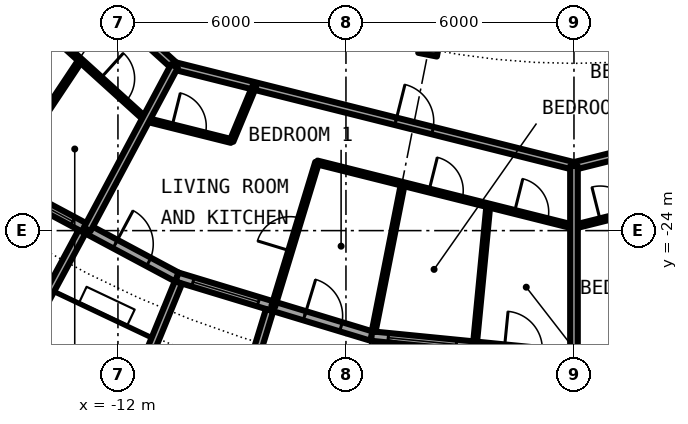
"""IFC4 building model, lengths in metres.
Left out: names, types, materials, properties, quantities, classifications, styles, units other than length and angle.
Written with IfcOpenShell. Run it as: python <this file> out.ifc"""

import sys

from ifc_helpers import new_model, si_unit, direction, frame, frame_2d, origin, origin_2d, place, context, subcontext, project, spatial, rectangle, i_section, extrude, element, fill, save


model = new_model("IFC4")
c1 = context("Model", 3, precision=1e-05, world=origin(), true_north=direction((0.0, 1.0)))
c2 = subcontext(c1, "Body", "Model", "MODEL_VIEW")
j1 = project(units=[si_unit("LENGTHUNIT", "METRE"), si_unit("PLANEANGLEUNIT", "RADIAN")], contexts=[c1])
p1 = place(None, origin())
s1 = spatial("IfcSite", under=j1, at=p1, CompositionType="ELEMENT")
p2 = place(p1, origin())
s2 = spatial("IfcBuilding", under=s1, at=p2, CompositionType="ELEMENT")
p3 = place(p2, frame((0.0, 0.0, 161.6)))
s3 = spatial("IfcBuildingStorey", under=s2, at=p3, CompositionType="ELEMENT", Elevation=161.6)
p4 = place(p3, frame((-3.824, -19.223, 0.0), z_axis=(0.0, 0.0, 1.0), x_axis=(-0.195090322016, -0.980785280403, 0.0)))
e1 = element("IfcColumn", 1, at=p4, inside=s3, PredefinedType="COLUMN", context=c2, shape_type="SweptSolid", body=[
    extrude(i_section(OverallWidth=0.3, OverallDepth=0.5, WebThickness=0.014, FlangeThickness=0.028, FilletRadius=0.027, at=origin_2d()), origin(), (0.0, 0.0, 1.0), 3.05),
])
p5 = place(p3, frame((-15.167, -22.699, 0.0), z_axis=(0.0, 0.0, 1.0), x_axis=(0.881915646801, -0.471407246368, 0.0)))
e2 = element("IfcWall", 2, at=p5, inside=s3, PredefinedType="SOLIDWALL", context=c2, shape_type="SweptSolid", body=[
    extrude(rectangle(XDim=5.352, YDim=0.25, at=frame_2d((2.676, 0.0))), origin(), (0.0, 0.0, 1.0), 2.7),
])
p6 = place(p5, frame((0.441, 0.0, 0.3)))
e3 = element("IfcOpeningElement", 3, at=p6, cuts=e2, PredefinedType="OPENING", context=c2, shape_type="SweptSolid", body=[
    extrude(rectangle(XDim=1.8, YDim=2.1, at=frame_2d((0.9, 1.05))), frame((0.0, 0.135, 0.0), z_axis=(0.0, -1.0, 0.0), x_axis=(1.0, 0.0, 0.0)), (0.0, 0.0, 1.0), 0.27),
])
p7 = place(p5, frame((3.51, 0.0, 0.0)))
e4 = element("IfcOpeningElement", 4, at=p7, cuts=e2, PredefinedType="OPENING", context=c2, shape_type="SweptSolid", body=[
    extrude(rectangle(XDim=1.0, YDim=2.2, at=frame_2d((0.5, 1.1))), frame((0.0, 0.135, 0.0), z_axis=(0.0, -1.0, 0.0), x_axis=(1.0, 0.0, 0.0)), (0.0, 0.0, 1.0), 0.27),
])
p8 = place(p3, frame((-12.945, -24.029, -0.03), z_axis=(0.0, 0.0, 1.0), x_axis=(-0.474424310775, -0.88029629861, 0.0)))
e5 = element("IfcWall", 5, at=p8, inside=s3, PredefinedType="SOLIDWALL", context=c2, shape_type="SweptSolid", body=[
    extrude(rectangle(XDim=3.006, YDim=0.2, at=frame_2d((1.503, 0.0))), origin(), (0.0, 0.0, 1.0), 2.73),
])
p9 = place(p3, frame((-10.447, -25.222, 0.0), z_axis=(0.0, 0.0, 1.0), x_axis=(0.956965678721, -0.290201119486, 0.0)))
e6 = element("IfcWall", 6, at=p9, inside=s3, PredefinedType="SOLIDWALL", context=c2, shape_type="SweptSolid", body=[
    extrude(rectangle(XDim=5.351, YDim=0.25, at=frame_2d((2.676, 0.0))), origin(), (0.0, 0.0, 1.0), 2.7),
])
p10 = place(p9, frame((0.441, 0.0, 0.3)))
e7 = element("IfcOpeningElement", 7, at=p10, cuts=e6, PredefinedType="OPENING", context=c2, shape_type="SweptSolid", body=[
    extrude(rectangle(XDim=1.8, YDim=2.1, at=frame_2d((0.9, 1.05))), frame((0.0, 0.135, 0.0), z_axis=(0.0, -1.0, 0.0), x_axis=(1.0, 0.0, 0.0)), (0.0, 0.0, 1.0), 0.27),
])
p11 = place(p9, frame((3.51, 0.0, 0.0)))
e8 = element("IfcOpeningElement", 8, at=p11, cuts=e6, PredefinedType="OPENING", context=c2, shape_type="SweptSolid", body=[
    extrude(rectangle(XDim=1.0, YDim=2.2, at=frame_2d((0.5, 1.1))), frame((0.0, 0.135, 0.0), z_axis=(0.0, -1.0, 0.0), x_axis=(1.0, 0.0, 0.0)), (0.0, 0.0, 1.0), 0.27),
])
p12 = place(p3, frame((-10.409, -25.364, -0.03), z_axis=(0.0, 0.0, 1.0), x_axis=(-0.379509886562, -0.925187681501, 0.0)))
e9 = element("IfcWall", 9, at=p12, inside=s3, PredefinedType="SOLIDWALL", context=c2, shape_type="SweptSolid", body=[
    extrude(rectangle(XDim=2.883, YDim=0.2, at=frame_2d((1.441, 0.0))), origin(), (0.0, 0.0, 1.0), 2.73),
])
p13 = place(p3, frame((-8.009, -26.092, -0.03), z_axis=(0.0, 0.0, 1.0), x_axis=(-0.293406695073, -0.955987715029, 0.0)))
e10 = element("IfcWall", 10, at=p13, inside=s3, PredefinedType="SOLIDWALL", context=c2, shape_type="SweptSolid", body=[
    extrude(rectangle(XDim=3.006, YDim=0.2, at=frame_2d((1.503, 0.0))), origin(), (0.0, 0.0, 1.0), 2.73),
])
p14 = place(p3, frame((-5.326, -26.775, 0.0), z_axis=(0.0, 0.0, 1.0), x_axis=(0.995173996315, -0.098126026407, 0.0)))
e11 = element("IfcWall", 11, at=p14, inside=s3, PredefinedType="SOLIDWALL", context=c2, shape_type="SweptSolid", body=[
    extrude(rectangle(XDim=5.352, YDim=0.25, at=frame_2d((2.676, 0.0))), origin(), (0.0, 0.0, 1.0), 2.7),
])
p15 = place(p14, frame((0.441, 0.0, 0.3)))
e12 = element("IfcOpeningElement", 12, at=p15, cuts=e11, PredefinedType="OPENING", context=c2, shape_type="SweptSolid", body=[
    extrude(rectangle(XDim=1.8, YDim=2.1, at=frame_2d((0.9, 1.05))), frame((0.0, 0.135, 0.0), z_axis=(0.0, -1.0, 0.0), x_axis=(1.0, 0.0, 0.0)), (0.0, 0.0, 1.0), 0.27),
])
p16 = place(p14, frame((3.51, 0.0, 0.0)))
e13 = element("IfcOpeningElement", 13, at=p16, cuts=e11, PredefinedType="OPENING", context=c2, shape_type="SweptSolid", body=[
    extrude(rectangle(XDim=1.0, YDim=2.2, at=frame_2d((0.5, 1.1))), frame((0.0, 0.135, 0.0), z_axis=(0.0, -1.0, 0.0), x_axis=(1.0, 0.0, 0.0)), (0.0, 0.0, 1.0), 0.27),
])
p17 = place(p3, frame((-4.769, -26.956, -0.03), z_axis=(0.0, 0.0, 1.0), x_axis=(-0.174056778901, -0.984735618183, 0.0)))
e14 = element("IfcWall", 14, at=p17, inside=s3, PredefinedType="SOLIDWALL", context=c2, shape_type="SweptSolid", body=[
    extrude(rectangle(XDim=2.925, YDim=0.2, at=frame_2d((1.462, 0.0))), origin(), (0.0, 0.0, 1.0), 2.73),
])
p18 = place(p3, frame((0.0, -27.3, 0.0), z_axis=(0.0, 0.0, 1.0), x_axis=(0.995173996315, 0.098126026407, 0.0)))
e15 = element("IfcWall", 15, at=p18, inside=s3, PredefinedType="SOLIDWALL", context=c2, shape_type="SweptSolid", body=[
    extrude(rectangle(XDim=5.352, YDim=0.25, at=frame_2d((2.676, 0.0))), origin(), (0.0, 0.0, 1.0), 2.7),
])
p19 = place(p18, frame((0.441, 0.0, 0.3)))
e16 = element("IfcOpeningElement", 16, at=p19, cuts=e15, PredefinedType="OPENING", context=c2, shape_type="SweptSolid", body=[
    extrude(rectangle(XDim=1.8, YDim=2.1, at=frame_2d((0.9, 1.05))), frame((0.0, 0.135, 0.0), z_axis=(0.0, -1.0, 0.0), x_axis=(1.0, 0.0, 0.0)), (0.0, 0.0, 1.0), 0.27),
])
p20 = place(p18, frame((3.51, 0.0, 0.0)))
e17 = element("IfcOpeningElement", 17, at=p20, cuts=e15, PredefinedType="OPENING", context=c2, shape_type="SweptSolid", body=[
    extrude(rectangle(XDim=1.0, YDim=2.2, at=frame_2d((0.5, 1.1))), frame((0.0, 0.135, 0.0), z_axis=(0.0, -1.0, 0.0), x_axis=(1.0, 0.0, 0.0)), (0.0, 0.0, 1.0), 0.27),
])
p21 = place(p3, frame((-16.432, -16.396, 0.0), z_axis=(0.0, 0.0, 1.0), x_axis=(0.740901429238, -0.671613781986, 0.0)))
e18 = element("IfcWall", 18, at=p21, inside=s3, PredefinedType="PARTITIONING", context=c2, shape_type="SweptSolid", body=[
    extrude(rectangle(XDim=6.97, YDim=0.1, at=frame_2d((3.485, 0.0))), origin(), (0.0, 0.0, 1.0), 2.7),
])
p22 = place(p21, frame((3.038, 0.0, 0.0)))
e19 = element("IfcOpeningElement", 19, at=p22, cuts=e18, PredefinedType="OPENING", context=c2, shape_type="SweptSolid", body=[
    extrude(rectangle(XDim=0.9, YDim=2.3, at=frame_2d((0.45, 1.15))), frame((0.0, 0.06, 0.0), z_axis=(0.0, -1.0, 0.0), x_axis=(1.0, 0.0, 0.0)), (0.0, 0.0, 1.0), 0.12),
])
p23 = place(p21, frame((5.36, 0.0, 0.0)))
e20 = element("IfcOpeningElement", 20, at=p23, cuts=e18, PredefinedType="OPENING", context=c2, shape_type="SweptSolid", body=[
    extrude(rectangle(XDim=0.9, YDim=2.3, at=frame_2d((0.45, 1.15))), frame((0.0, 0.06, 0.0), z_axis=(0.0, -1.0, 0.0), x_axis=(1.0, 0.0, 0.0)), (0.0, 0.0, 1.0), 0.12),
])
p24 = place(p3, frame((-11.268, -21.078, 0.0), z_axis=(0.0, 0.0, 1.0), x_axis=(0.970018653366, -0.243030475708, 0.0)))
e21 = element("IfcWall", 21, at=p24, inside=s3, PredefinedType="PARTITIONING", context=c2, shape_type="SweptSolid", body=[
    extrude(rectangle(XDim=2.322, YDim=0.1, at=frame_2d((1.161, 0.0))), origin(), (0.0, 0.0, 1.0), 2.7),
])
p25 = place(p24, frame((0.713, 0.0, 0.0)))
e22 = element("IfcOpeningElement", 22, at=p25, cuts=e21, PredefinedType="OPENING", context=c2, shape_type="SweptSolid", body=[
    extrude(rectangle(XDim=0.9, YDim=2.3, at=frame_2d((0.45, 1.15))), frame((0.0, 0.06, 0.0), z_axis=(0.0, -1.0, 0.0), x_axis=(1.0, 0.0, 0.0)), (0.0, 0.0, 1.0), 0.12),
])
p26 = place(p3, frame((-6.762, -22.206, 0.0), z_axis=(0.0, 0.0, 1.0), x_axis=(0.97002908491, -0.242988836015, 0.0)))
e23 = element("IfcWall", 23, at=p26, inside=s3, PredefinedType="PARTITIONING", context=c2, shape_type="SweptSolid", body=[
    extrude(rectangle(XDim=6.971, YDim=0.1, at=frame_2d((3.485, 0.0))), origin(), (0.0, 0.0, 1.0), 2.7),
])
p27 = place(p26, frame((3.039, 0.0, 0.0)))
e24 = element("IfcOpeningElement", 24, at=p27, cuts=e23, PredefinedType="OPENING", context=c2, shape_type="SweptSolid", body=[
    extrude(rectangle(XDim=0.9, YDim=2.3, at=frame_2d((0.45, 1.15))), frame((0.0, 0.06, 0.0), z_axis=(0.0, -1.0, 0.0), x_axis=(1.0, 0.0, 0.0)), (0.0, 0.0, 1.0), 0.12),
])
p28 = place(p26, frame((5.358, 0.0, 0.0)))
e25 = element("IfcOpeningElement", 25, at=p28, cuts=e23, PredefinedType="OPENING", context=c2, shape_type="SweptSolid", body=[
    extrude(rectangle(XDim=0.9, YDim=2.3, at=frame_2d((0.45, 1.15))), frame((0.0, 0.06, 0.0), z_axis=(0.0, -1.0, 0.0), x_axis=(1.0, 0.0, 0.0)), (0.0, 0.0, 1.0), 0.12),
])
p29 = place(p3, frame((0.0, -23.9, 0.0), z_axis=(0.0, 0.0, 1.0), x_axis=(0.97002908491, 0.242988836015, 0.0)))
e26 = element("IfcWall", 26, at=p29, inside=s3, PredefinedType="PARTITIONING", context=c2, shape_type="SweptSolid", body=[
    extrude(rectangle(XDim=6.971, YDim=0.1, at=frame_2d((3.485, 0.0))), origin(), (0.0, 0.0, 1.0), 2.7),
])
p30 = place(p29, frame((3.032, 0.0, 0.0)))
e27 = element("IfcOpeningElement", 27, at=p30, cuts=e26, PredefinedType="OPENING", context=c2, shape_type="SweptSolid", body=[
    extrude(rectangle(XDim=0.9, YDim=2.3, at=frame_2d((0.45, 1.15))), frame((0.0, 0.06, 0.0), z_axis=(0.0, -1.0, 0.0), x_axis=(1.0, 0.0, 0.0)), (0.0, 0.0, 1.0), 0.12),
])
p31 = place(p29, frame((0.712, 0.0, 0.0)))
e28 = element("IfcOpeningElement", 28, at=p31, cuts=e26, PredefinedType="OPENING", context=c2, shape_type="SweptSolid", body=[
    extrude(rectangle(XDim=0.9, YDim=2.3, at=frame_2d((0.45, 1.15))), frame((0.0, 0.06, 0.0), z_axis=(0.0, -1.0, 0.0), x_axis=(1.0, 0.0, 0.0)), (0.0, 0.0, 1.0), 0.12),
])
p32 = place(p3, frame((-18.542, -12.389, 0.0), z_axis=(0.0, 0.0, 1.0), x_axis=(0.740947367223, -0.671563101283, 0.0)))
e29 = element("IfcWall", 29, at=p32, inside=s3, PredefinedType="PARTITIONING", context=c2, shape_type="SweptSolid", body=[
    extrude(rectangle(XDim=10.837, YDim=0.2, at=frame_2d((5.419, 0.0))), origin(), (0.0, 0.0, 1.0), 2.7),
])
p33 = place(p32, frame((6.002, 0.0, 0.0)))
e30 = element("IfcOpeningElement", 30, at=p33, cuts=e29, PredefinedType="OPENING", context=c2, shape_type="SweptSolid", body=[
    extrude(rectangle(XDim=1.0, YDim=2.3, at=frame_2d((0.5, 1.15))), frame((0.0, 0.11, 0.0), z_axis=(0.0, -1.0, 0.0), x_axis=(1.0, 0.0, 0.0)), (0.0, 0.0, 1.0), 0.22),
])
p34 = place(p3, frame((-10.518, -19.665, 0.0), z_axis=(0.0, 0.0, 1.0), x_axis=(0.970023181991, -0.243012399685, 0.0)))
e31 = element("IfcWall", 31, at=p34, inside=s3, PredefinedType="PARTITIONING", context=c2, shape_type="SweptSolid", body=[
    extrude(rectangle(XDim=10.843, YDim=0.2, at=frame_2d((5.421, 0.0))), origin(), (0.0, 0.0, 1.0), 2.7),
])
p35 = place(p34, frame((6.008, 0.0, 0.0)))
e32 = element("IfcOpeningElement", 32, at=p35, cuts=e31, PredefinedType="OPENING", context=c2, shape_type="SweptSolid", body=[
    extrude(rectangle(XDim=1.0, YDim=2.3, at=frame_2d((0.5, 1.15))), frame((0.0, 0.11, 0.0), z_axis=(0.0, -1.0, 0.0), x_axis=(1.0, 0.0, 0.0)), (0.0, 0.0, 1.0), 0.22),
])
p36 = place(p3, frame((0.0, -22.3, 0.0), z_axis=(0.0, 0.0, 1.0), x_axis=(0.970023181991, 0.243012399685, 0.0)))
e33 = element("IfcWall", 33, at=p36, inside=s3, PredefinedType="PARTITIONING", context=c2, shape_type="SweptSolid", body=[
    extrude(rectangle(XDim=10.843, YDim=0.2, at=frame_2d((5.421, 0.0))), origin(), (0.0, 0.0, 1.0), 2.7),
])
p37 = place(p36, frame((3.835, 0.0, 0.0)))
e34 = element("IfcOpeningElement", 34, at=p37, cuts=e33, PredefinedType="OPENING", context=c2, shape_type="SweptSolid", body=[
    extrude(rectangle(XDim=1.0, YDim=2.3, at=frame_2d((0.5, 1.15))), frame((0.0, 0.11, 0.0), z_axis=(0.0, -1.0, 0.0), x_axis=(1.0, 0.0, 0.0)), (0.0, 0.0, 1.0), 0.22),
])
p38 = place(p3, frame((-15.054, -22.624, 0.0), z_axis=(0.0, 0.0, 1.0), x_axis=(0.553823887887, 0.83263383381, 0.0)))
e35 = element("IfcWall", 35, at=p38, inside=s3, PredefinedType="PARTITIONING", context=c2, shape_type="SweptSolid", body=[
    extrude(rectangle(XDim=3.73, YDim=0.1, at=frame_2d((1.865, 0.0))), origin(), (0.0, 0.0, 1.0), 2.7),
])
p39 = place(p3, frame((-12.81, -23.966, 0.0), z_axis=(0.0, 0.0, 1.0), x_axis=(0.471427642527, 0.881904744211, 0.0)))
e36 = element("IfcWall", 36, at=p39, inside=s3, PredefinedType="PARTITIONING", context=c2, shape_type="SweptSolid", body=[
    extrude(rectangle(XDim=4.875, YDim=0.2, at=frame_2d((2.438, 0.0))), origin(), (0.0, 0.0, 1.0), 2.7),
])
p40 = place(p3, frame((-9.01, -21.643, 0.0), z_axis=(0.0, 0.0, 1.0), x_axis=(0.384228756538, 0.923237923099, 0.0)))
e37 = element("IfcWall", 37, at=p40, inside=s3, PredefinedType="PARTITIONING", context=c2, shape_type="SweptSolid", body=[
    extrude(rectangle(XDim=1.569, YDim=0.1, at=frame_2d((0.785, 0.0))), origin(), (0.0, 0.0, 1.0), 2.7),
])
p41 = place(p3, frame((-7.914, -25.997, 0.0), z_axis=(0.0, 0.0, 1.0), x_axis=(0.291291575636, 0.956634317785, 0.0)))
e38 = element("IfcWall", 38, at=p41, inside=s3, PredefinedType="PARTITIONING", context=c2, shape_type="SweptSolid", body=[
    extrude(rectangle(XDim=3.962, YDim=0.1, at=frame_2d((1.981, 0.0))), origin(), (0.0, 0.0, 1.0), 2.7),
])
p42 = place(p41, frame((1.531, 0.0, 0.0)))
e39 = element("IfcOpeningElement", 39, at=p42, cuts=e38, PredefinedType="OPENING", context=c2, shape_type="SweptSolid", body=[
    extrude(rectangle(XDim=0.9, YDim=2.3, at=frame_2d((0.45, 1.15))), frame((0.0, 0.06, 0.0), z_axis=(0.0, -1.0, 0.0), x_axis=(1.0, 0.0, 0.0)), (0.0, 0.0, 1.0), 0.12),
])
p43 = place(p3, frame((-5.272, -26.659, 0.0), z_axis=(0.0, 0.0, 1.0), x_axis=(0.194089507313, 0.980983824103, 0.0)))
e40 = element("IfcWall", 40, at=p43, inside=s3, PredefinedType="PARTITIONING", context=c2, shape_type="SweptSolid", body=[
    extrude(rectangle(XDim=3.962, YDim=0.1, at=frame_2d((1.981, 0.0))), origin(), (0.0, 0.0, 1.0), 2.7),
])
p44 = place(p3, frame((-2.612, -27.049, 0.0), z_axis=(0.0, 0.0, 1.0), x_axis=(0.09626981452, 0.995355274669, 0.0)))
e41 = element("IfcWall", 41, at=p44, inside=s3, PredefinedType="PARTITIONING", context=c2, shape_type="SweptSolid", body=[
    extrude(rectangle(XDim=3.73, YDim=0.1, at=frame_2d((1.865, 0.0))), origin(), (0.0, 0.0, 1.0), 2.7),
])
p45 = place(p3, frame((0.0, -27.175, 0.0), z_axis=(0.0, 0.0, 1.0), x_axis=(0.0, 1.0, 0.0)))
e42 = element("IfcWall", 42, at=p45, inside=s3, PredefinedType="PARTITIONING", context=c2, shape_type="SweptSolid", body=[
    extrude(rectangle(XDim=4.875, YDim=0.2, at=frame_2d((2.438, 0.0))), origin(), (0.0, 0.0, 1.0), 2.7),
])
p46 = place(p6, origin())
e43 = element("IfcWindow", 43, at=p46, inside=s3, PartitioningType="SINGLE_PANEL", PredefinedType="WINDOW", context=c2, shape_type="SweptSolid", body=[
    extrude(rectangle(XDim=1.8, YDim=2.1, at=frame_2d((0.9, 1.05))), frame((0.0, 0.03, 0.0), z_axis=(0.0, -1.0, 0.0), x_axis=(1.0, 0.0, 0.0)), (0.0, 0.0, 1.0), 0.06),
])
fill(e3, e43)
p47 = place(p7, origin())
e44 = element("IfcDoor", 44, at=p47, inside=s3, OperationType="SINGLE_SWING_LEFT", PredefinedType="DOOR", context=c2, shape_type="SweptSolid", body=[
    extrude(rectangle(XDim=1.0, YDim=2.2, at=frame_2d((0.5, 1.1))), frame((0.0, 0.025, 0.0), z_axis=(0.0, -1.0, 0.0), x_axis=(1.0, 0.0, 0.0)), (0.0, 0.0, 1.0), 0.05),
])
fill(e4, e44)
p48 = place(p10, origin())
e45 = element("IfcWindow", 45, at=p48, inside=s3, PartitioningType="SINGLE_PANEL", PredefinedType="WINDOW", context=c2, shape_type="SweptSolid", body=[
    extrude(rectangle(XDim=1.8, YDim=2.1, at=frame_2d((0.9, 1.05))), frame((0.0, 0.03, 0.0), z_axis=(0.0, -1.0, 0.0), x_axis=(1.0, 0.0, 0.0)), (0.0, 0.0, 1.0), 0.06),
])
fill(e7, e45)
p49 = place(p11, origin())
e46 = element("IfcDoor", 46, at=p49, inside=s3, OperationType="SINGLE_SWING_LEFT", PredefinedType="DOOR", context=c2, shape_type="SweptSolid", body=[
    extrude(rectangle(XDim=1.0, YDim=2.2, at=frame_2d((0.5, 1.1))), frame((0.0, 0.025, 0.0), z_axis=(0.0, -1.0, 0.0), x_axis=(1.0, 0.0, 0.0)), (0.0, 0.0, 1.0), 0.05),
])
fill(e8, e46)
p50 = place(p15, origin())
e47 = element("IfcWindow", 47, at=p50, inside=s3, PartitioningType="SINGLE_PANEL", PredefinedType="WINDOW", context=c2, shape_type="SweptSolid", body=[
    extrude(rectangle(XDim=1.8, YDim=2.1, at=frame_2d((0.9, 1.05))), frame((0.0, 0.03, 0.0), z_axis=(0.0, -1.0, 0.0), x_axis=(1.0, 0.0, 0.0)), (0.0, 0.0, 1.0), 0.06),
])
fill(e12, e47)
p51 = place(p23, origin())
e48 = element("IfcDoor", 48, at=p51, inside=s3, OperationType="SINGLE_SWING_RIGHT", PredefinedType="DOOR", context=c2, shape_type="SweptSolid", body=[
    extrude(rectangle(XDim=0.9, YDim=2.3, at=frame_2d((0.45, 1.15))), frame((0.0, 0.025, 0.0), z_axis=(0.0, -1.0, 0.0), x_axis=(1.0, 0.0, 0.0)), (0.0, 0.0, 1.0), 0.05),
])
fill(e20, e48)
p52 = place(p35, origin())
e49 = element("IfcDoor", 49, at=p52, inside=s3, OperationType="SINGLE_SWING_RIGHT", PredefinedType="DOOR", context=c2, shape_type="SweptSolid", body=[
    extrude(rectangle(XDim=1.0, YDim=2.3, at=frame_2d((0.5, 1.15))), frame((0.0, 0.025, 0.0), z_axis=(0.0, -1.0, 0.0), x_axis=(1.0, 0.0, 0.0)), (0.0, 0.0, 1.0), 0.05),
])
fill(e32, e49)
p53 = place(p25, origin())
e50 = element("IfcDoor", 50, at=p53, inside=s3, OperationType="SINGLE_SWING_RIGHT", PredefinedType="DOOR", context=c2, shape_type="SweptSolid", body=[
    extrude(rectangle(XDim=0.9, YDim=2.3, at=frame_2d((0.45, 1.15))), frame((0.0, 0.025, 0.0), z_axis=(0.0, -1.0, 0.0), x_axis=(1.0, 0.0, 0.0)), (0.0, 0.0, 1.0), 0.05),
])
fill(e22, e50)
p54 = place(p42, origin())
e51 = element("IfcDoor", 51, at=p54, inside=s3, OperationType="SINGLE_SWING_RIGHT", PredefinedType="DOOR", context=c2, shape_type="SweptSolid", body=[
    extrude(rectangle(XDim=0.9, YDim=2.3, at=frame_2d((0.45, 1.15))), frame((0.0, 0.025, 0.0), z_axis=(0.0, -1.0, 0.0), x_axis=(1.0, 0.0, 0.0)), (0.0, 0.0, 1.0), 0.05),
])
fill(e39, e51)
p55 = place(p27, origin())
e52 = element("IfcDoor", 52, at=p55, inside=s3, OperationType="SINGLE_SWING_RIGHT", PredefinedType="DOOR", context=c2, shape_type="SweptSolid", body=[
    extrude(rectangle(XDim=0.9, YDim=2.3, at=frame_2d((0.45, 1.15))), frame((0.0, 0.025, 0.0), z_axis=(0.0, -1.0, 0.0), x_axis=(1.0, 0.0, 0.0)), (0.0, 0.0, 1.0), 0.05),
])
fill(e24, e52)
p56 = place(p28, origin())
e53 = element("IfcDoor", 53, at=p56, inside=s3, OperationType="SINGLE_SWING_RIGHT", PredefinedType="DOOR", context=c2, shape_type="SweptSolid", body=[
    extrude(rectangle(XDim=0.9, YDim=2.3, at=frame_2d((0.45, 1.15))), frame((0.0, 0.025, 0.0), z_axis=(0.0, -1.0, 0.0), x_axis=(1.0, 0.0, 0.0)), (0.0, 0.0, 1.0), 0.05),
])
fill(e25, e53)
p57 = place(p31, origin())
e54 = element("IfcDoor", 54, at=p57, inside=s3, OperationType="SINGLE_SWING_LEFT", PredefinedType="DOOR", context=c2, shape_type="SweptSolid", body=[
    extrude(rectangle(XDim=0.9, YDim=2.3, at=frame_2d((0.45, 1.15))), frame((0.0, 0.025, 0.0), z_axis=(0.0, -1.0, 0.0), x_axis=(1.0, 0.0, 0.0)), (0.0, 0.0, 1.0), 0.05),
])
fill(e28, e54)
save(model, sys.argv[1])
